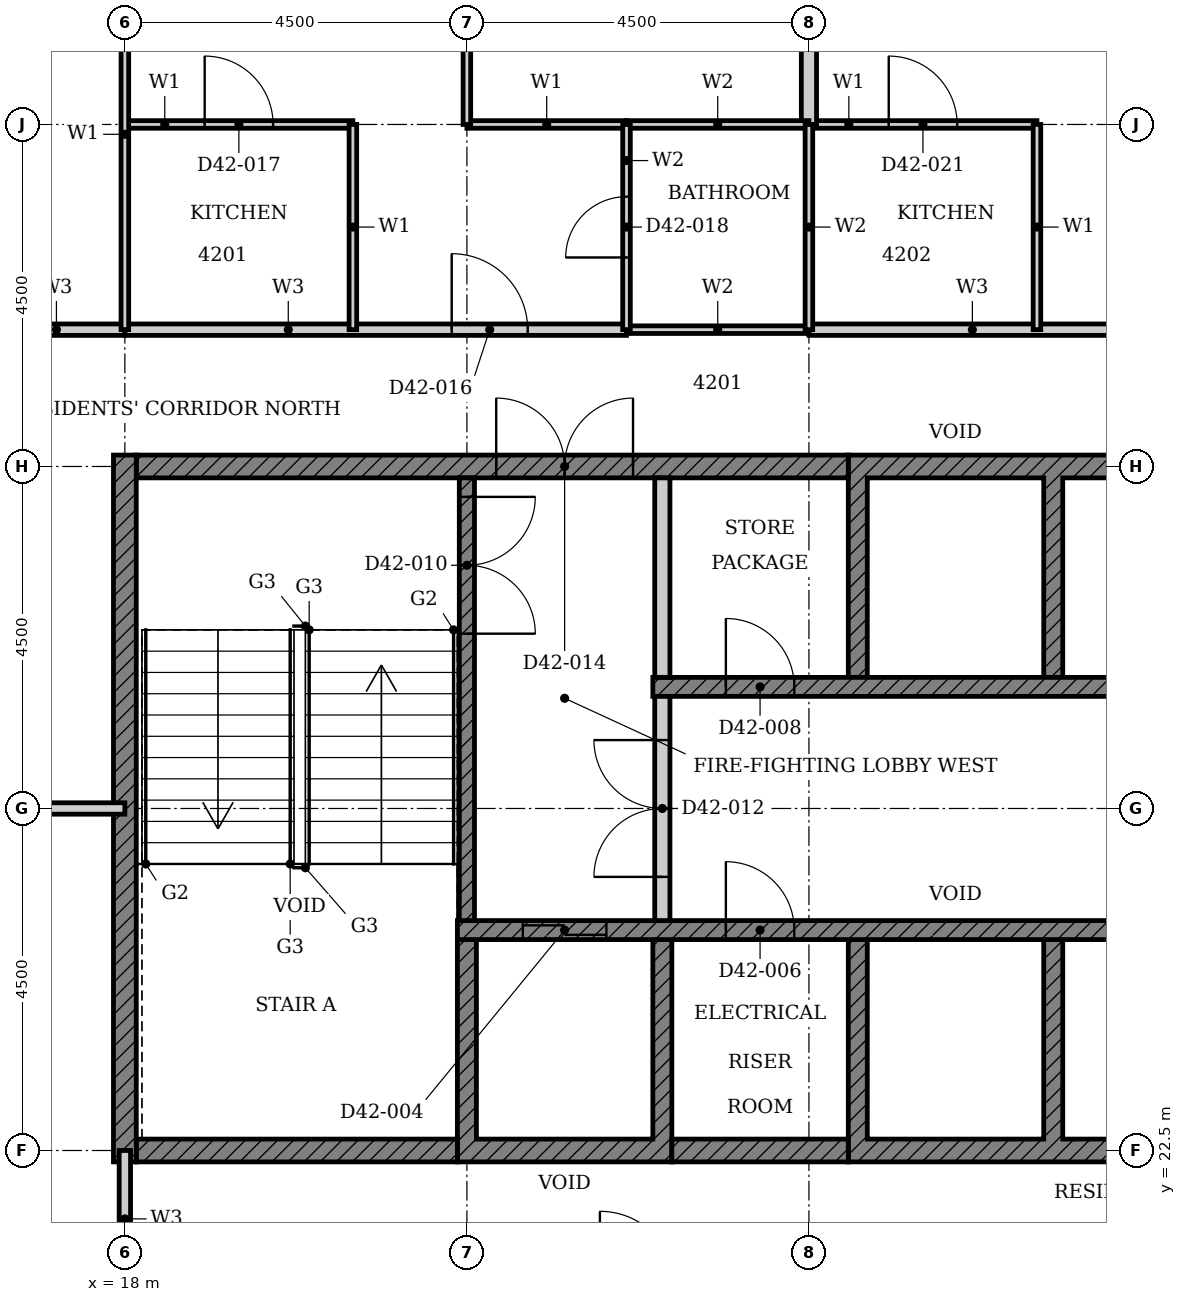
"""IFC4 building model, lengths in metres.
Left out: names, types, materials, properties, quantities, classifications, styles, units other than length and angle.
Written with IfcOpenShell. Run it as: python <this file> out.ifc"""

import sys

from ifc_helpers import new_model, si_unit, direction, frame, frame_2d, origin, place, context, subcontext, project, spatial, polyline, rectangle, outline, extrude, element, fill, save


model = new_model("IFC4")
c1 = context("Model", 3, precision=1e-05, world=origin(), true_north=direction((0.0, 1.0)))
c2 = subcontext(c1, "Body", "Model", "MODEL_VIEW")
j1 = project(units=[si_unit("LENGTHUNIT", "METRE"), si_unit("PLANEANGLEUNIT", "RADIAN")], contexts=[c1])
p1 = place(None, origin())
s1 = spatial("IfcSite", under=j1, at=p1, CompositionType="ELEMENT")
p2 = place(p1, origin())
s2 = spatial("IfcBuilding", under=s1, at=p2, CompositionType="ELEMENT")
p3 = place(p2, frame((0.0, 0.0, 169.1)))
s3 = spatial("IfcBuildingStorey", under=s2, at=p3, CompositionType="ELEMENT", Elevation=169.1)
p4 = place(p3, origin())
e1 = element("IfcWall", 1, at=p4, inside=s3, PredefinedType="SHEAR", context=c2, shape_type="SweptSolid", body=[
    extrude(outline(polyline([(22.375, 22.35), (25.197, 22.35), (25.197, 25.275), (24.947, 25.275), (24.947, 22.65), (22.625, 22.65), (22.625, 25.275), (22.375, 25.275), (22.375, 22.35)])), origin(), (0.0, 0.0, 1.0), 3.4),
])
p5 = place(p3, origin())
e2 = element("IfcWall", 2, at=p5, inside=s3, PredefinedType="SHEAR", context=c2, shape_type="SweptSolid", body=[
    extrude(outline(polyline([(27.518, 22.35), (32.911, 22.35), (32.911, 25.275), (32.661, 25.275), (32.661, 22.65), (30.339, 22.65), (30.339, 25.275), (30.089, 25.275), (30.089, 22.65), (27.768, 22.65), (27.768, 25.275), (27.518, 25.275), (27.518, 22.35)])), origin(), (0.0, 0.0, 1.0), 3.4),
])
p6 = place(p3, origin())
e3 = element("IfcWall", 3, at=p6, inside=s3, PredefinedType="SHEAR", context=c2, shape_type="SweptSolid", body=[
    extrude(outline(polyline([(27.518, 28.725), (27.768, 28.725), (27.768, 31.35), (30.089, 31.35), (30.089, 28.725), (30.339, 28.725), (30.339, 31.35), (32.661, 31.35), (32.661, 28.725), (32.911, 28.725), (32.911, 31.65), (27.518, 31.65), (27.518, 28.725)])), origin(), (0.0, 0.0, 1.0), 3.4),
])
p7 = place(p3, frame((18.15, 22.5, 0.0), z_axis=(0.0, 0.0, 1.0), x_axis=(1.0, 0.0, 0.0)))
e4 = element("IfcWall", 4, at=p7, inside=s3, PredefinedType="SHEAR", context=c2, shape_type="SweptSolid", body=[
    extrude(rectangle(XDim=4.225, YDim=0.3, at=frame_2d((2.113, 0.0))), origin(), (0.0, 0.0, 1.0), 3.4),
])
p8 = place(p3, frame((25.197, 22.5, 0.0), z_axis=(0.0, 0.0, 1.0), x_axis=(1.0, 0.0, 0.0)))
e5 = element("IfcWall", 5, at=p8, inside=s3, PredefinedType="SHEAR", context=c2, shape_type="SweptSolid", body=[
    extrude(rectangle(XDim=2.321, YDim=0.3, at=frame_2d((1.161, 0.0))), origin(), (0.0, 0.0, 1.0), 3.4),
])
p9 = place(p3, frame((18.15, 31.5, 0.0), z_axis=(0.0, 0.0, 1.0), x_axis=(1.0, 0.0, 0.0)))
e6 = element("IfcWall", 6, at=p9, inside=s3, PredefinedType="SHEAR", context=c2, shape_type="SweptSolid", body=[
    extrude(rectangle(XDim=9.368, YDim=0.3, at=frame_2d((4.684, 0.0))), origin(), (0.0, 0.0, 1.0), 3.4),
])
p10 = place(p9, frame((4.736, 0.0, 0.0)))
e7 = element("IfcOpeningElement", 7, at=p10, cuts=e6, PredefinedType="OPENING", context=c2, shape_type="SweptSolid", body=[
    extrude(rectangle(XDim=1.8, YDim=2.1, at=frame_2d((0.9, 1.05))), frame((0.0, 0.16, 0.0), z_axis=(0.0, -1.0, 0.0), x_axis=(1.0, 0.0, 0.0)), (0.0, 0.0, 1.0), 0.32),
])
p11 = place(p3, frame((18.0, 22.35, 0.0), z_axis=(0.0, 0.0, 1.0), x_axis=(0.0, 1.0, 0.0)))
e8 = element("IfcWall", 8, at=p11, inside=s3, PredefinedType="SHEAR", context=c2, shape_type="SweptSolid", body=[
    extrude(rectangle(XDim=9.3, YDim=0.3, at=frame_2d((4.65, 0.0))), origin(), (0.0, 0.0, 1.0), 3.4),
])
p12 = place(p3, frame((22.375, 25.4, 0.0), z_axis=(0.0, 0.0, 1.0), x_axis=(1.0, 0.0, 0.0)))
e9 = element("IfcWall", 9, at=p12, inside=s3, PredefinedType="SHEAR", context=c2, shape_type="SweptSolid", body=[
    extrude(rectangle(XDim=15.678, YDim=0.25, at=frame_2d((7.839, 0.0))), origin(), (0.0, 0.0, 1.0), 3.4),
])
p13 = place(p12, frame((8.575, 0.0, 0.0)))
e10 = element("IfcOpeningElement", 10, at=p13, cuts=e9, PredefinedType="OPENING", context=c2, shape_type="SweptSolid", body=[
    extrude(rectangle(XDim=1.1, YDim=2.1, at=frame_2d((0.55, 1.05))), frame((0.0, 0.135, 0.0), z_axis=(0.0, -1.0, 0.0), x_axis=(1.0, 0.0, 0.0)), (0.0, 0.0, 1.0), 0.27),
])
p14 = place(p12, frame((0.861, 0.0, 0.0)))
e11 = element("IfcOpeningElement", 11, at=p14, cuts=e9, PredefinedType="OPENING", context=c2, shape_type="SweptSolid", body=[
    extrude(rectangle(XDim=1.1, YDim=2.1, at=frame_2d((0.55, 1.05))), frame((0.0, 0.135, 0.0), z_axis=(0.0, -1.0, 0.0), x_axis=(1.0, 0.0, 0.0)), (0.0, 0.0, 1.0), 0.27),
])
p15 = place(p12, frame((3.532, 0.0, 0.0)))
e12 = element("IfcOpeningElement", 12, at=p15, cuts=e9, PredefinedType="OPENING", context=c2, shape_type="SweptSolid", body=[
    extrude(rectangle(XDim=0.9, YDim=2.1, at=frame_2d((0.45, 1.05))), frame((0.0, 0.135, 0.0), z_axis=(0.0, -1.0, 0.0), x_axis=(1.0, 0.0, 0.0)), (0.0, 0.0, 1.0), 0.27),
])
p16 = place(p12, frame((12.532, 0.0, 0.0)))
e13 = element("IfcOpeningElement", 13, at=p16, cuts=e9, PredefinedType="OPENING", context=c2, shape_type="SweptSolid", body=[
    extrude(rectangle(XDim=0.9, YDim=2.1, at=frame_2d((0.45, 1.05))), frame((0.0, 0.135, 0.0), z_axis=(0.0, -1.0, 0.0), x_axis=(1.0, 0.0, 0.0)), (0.0, 0.0, 1.0), 0.27),
])
p17 = place(p3, frame((24.947, 28.6, 0.0), z_axis=(0.0, 0.0, 1.0), x_axis=(1.0, 0.0, 0.0)))
e14 = element("IfcWall", 14, at=p17, inside=s3, PredefinedType="SHEAR", context=c2, shape_type="SweptSolid", body=[
    extrude(rectangle(XDim=15.678, YDim=0.25, at=frame_2d((7.839, 0.0))), origin(), (0.0, 0.0, 1.0), 3.4),
])
p18 = place(p17, frame((6.004, 0.0, 0.0)))
e15 = element("IfcOpeningElement", 15, at=p18, cuts=e14, PredefinedType="OPENING", context=c2, shape_type="SweptSolid", body=[
    extrude(rectangle(XDim=1.1, YDim=2.1, at=frame_2d((0.55, 1.05))), frame((0.0, 0.135, 0.0), z_axis=(0.0, -1.0, 0.0), x_axis=(1.0, 0.0, 0.0)), (0.0, 0.0, 1.0), 0.27),
])
p19 = place(p17, frame((11.146, 0.0, 0.0)))
e16 = element("IfcOpeningElement", 16, at=p19, cuts=e14, PredefinedType="OPENING", context=c2, shape_type="SweptSolid", body=[
    extrude(rectangle(XDim=1.1, YDim=2.1, at=frame_2d((0.55, 1.05))), frame((0.0, 0.135, 0.0), z_axis=(0.0, -1.0, 0.0), x_axis=(1.0, 0.0, 0.0)), (0.0, 0.0, 1.0), 0.27),
])
p20 = place(p17, frame((13.718, 0.0, 0.0)))
e17 = element("IfcOpeningElement", 17, at=p20, cuts=e14, PredefinedType="OPENING", context=c2, shape_type="SweptSolid", body=[
    extrude(rectangle(XDim=1.1, YDim=2.1, at=frame_2d((0.55, 1.05))), frame((0.0, 0.135, 0.0), z_axis=(0.0, -1.0, 0.0), x_axis=(1.0, 0.0, 0.0)), (0.0, 0.0, 1.0), 0.27),
])
p21 = place(p17, frame((0.961, 0.0, 0.0)))
e18 = element("IfcOpeningElement", 18, at=p21, cuts=e14, PredefinedType="OPENING", context=c2, shape_type="SweptSolid", body=[
    extrude(rectangle(XDim=0.9, YDim=2.1, at=frame_2d((0.45, 1.05))), frame((0.0, 0.135, 0.0), z_axis=(0.0, -1.0, 0.0), x_axis=(1.0, 0.0, 0.0)), (0.0, 0.0, 1.0), 0.27),
])
p22 = place(p17, frame((8.675, 0.0, 0.0)))
e19 = element("IfcOpeningElement", 19, at=p22, cuts=e14, PredefinedType="OPENING", context=c2, shape_type="SweptSolid", body=[
    extrude(rectangle(XDim=0.9, YDim=2.1, at=frame_2d((0.45, 1.05))), frame((0.0, 0.135, 0.0), z_axis=(0.0, -1.0, 0.0), x_axis=(1.0, 0.0, 0.0)), (0.0, 0.0, 1.0), 0.27),
])
p23 = place(p3, frame((25.072, 28.725, 0.0), z_axis=(0.0, 0.0, 1.0), x_axis=(0.0, 1.0, 0.0)))
e20 = element("IfcWall", 20, at=p23, inside=s3, PredefinedType="PARTITIONING", context=c2, shape_type="SweptSolid", body=[
    extrude(rectangle(XDim=2.625, YDim=0.2, at=frame_2d((1.312, 0.0))), origin(), (0.0, 0.0, 1.0), 3.4),
])
p24 = place(p3, frame((22.5, 31.35, 0.0), z_axis=(0.0, 0.0, 1.0), x_axis=(0.0, -1.0, 0.0)))
e21 = element("IfcWall", 21, at=p24, inside=s3, PredefinedType="SHEAR", context=c2, shape_type="SweptSolid", body=[
    extrude(rectangle(XDim=5.825, YDim=0.2, at=frame_2d((2.913, 0.0))), origin(), (0.0, 0.0, 1.0), 3.4),
])
p25 = place(p24, frame((0.25, 0.0, 0.0)))
e22 = element("IfcOpeningElement", 22, at=p25, cuts=e21, PredefinedType="OPENING", context=c2, shape_type="SweptSolid", body=[
    extrude(rectangle(XDim=1.8, YDim=2.1, at=frame_2d((0.9, 1.05))), frame((0.0, 0.11, 0.0), z_axis=(0.0, -1.0, 0.0), x_axis=(1.0, 0.0, 0.0)), (0.0, 0.0, 1.0), 0.22),
])
p26 = place(p3, frame((25.072, 25.525, 0.0), z_axis=(0.0, 0.0, 1.0), x_axis=(0.0, 1.0, 0.0)))
e23 = element("IfcWall", 23, at=p26, inside=s3, PredefinedType="PARTITIONING", context=c2, shape_type="SweptSolid", body=[
    extrude(rectangle(XDim=2.95, YDim=0.2, at=frame_2d((1.475, 0.0))), origin(), (0.0, 0.0, 1.0), 3.4),
])
p27 = place(p26, frame((0.575, 0.0, 0.0)))
e24 = element("IfcOpeningElement", 24, at=p27, cuts=e23, PredefinedType="OPENING", context=c2, shape_type="SweptSolid", body=[
    extrude(rectangle(XDim=1.8, YDim=2.1, at=frame_2d((0.9, 1.05))), frame((0.0, 0.11, 0.0), z_axis=(0.0, -1.0, 0.0), x_axis=(1.0, 0.0, 0.0)), (0.0, 0.0, 1.0), 0.22),
])
p28 = place(p3, frame((4.5, 27.0, 0.0), z_axis=(0.0, 0.0, 1.0), x_axis=(1.0, 0.0, 0.0)))
e25 = element("IfcWall", 25, at=p28, inside=s3, PredefinedType="PARTITIONING", context=c2, shape_type="SweptSolid", body=[
    extrude(rectangle(XDim=13.5, YDim=0.15, at=frame_2d((6.75, 0.0))), origin(), (0.0, 0.0, 1.0), 2.68),
])
p29 = place(p28, frame((5.35, 0.0, 0.0)))
e26 = element("IfcOpeningElement", 26, at=p29, cuts=e25, PredefinedType="OPENING", context=c2, shape_type="SweptSolid", body=[
    extrude(rectangle(XDim=1.0, YDim=2.1, at=frame_2d((0.5, 1.05))), frame((0.0, 0.085, 0.0), z_axis=(0.0, -1.0, 0.0), x_axis=(1.0, 0.0, 0.0)), (0.0, 0.0, 1.0), 0.17),
])
p30 = place(p3, frame((18.0, 33.3, 0.0), z_axis=(0.0, 0.0, 1.0), x_axis=(1.0, 0.0, 0.0)))
e27 = element("IfcWall", 27, at=p30, inside=s3, PredefinedType="PARTITIONING", context=c2, shape_type="SweptSolid", body=[
    extrude(rectangle(XDim=6.6, YDim=0.15, at=frame_2d((3.3, 0.0))), origin(), (0.0, 0.0, 1.0), 3.4),
])
p31 = place(p30, frame((4.3, 0.0, 0.0)))
e28 = element("IfcOpeningElement", 28, at=p31, cuts=e27, PredefinedType="OPENING", context=c2, shape_type="SweptSolid", body=[
    extrude(rectangle(XDim=1.0, YDim=2.2, at=frame_2d((0.5, 1.1))), frame((0.0, 0.085, 0.0), z_axis=(0.0, -1.0, 0.0), x_axis=(1.0, 0.0, 0.0)), (0.0, 0.0, 1.0), 0.17),
])
p32 = place(p3, frame((27.0, 33.3, 0.0), z_axis=(0.0, 0.0, 1.0), x_axis=(1.0, 0.0, 0.0)))
e29 = element("IfcWall", 29, at=p32, inside=s3, PredefinedType="PARTITIONING", context=c2, shape_type="SweptSolid", body=[
    extrude(rectangle(XDim=6.6, YDim=0.15, at=frame_2d((3.3, 0.0))), origin(), (0.0, 0.0, 1.0), 3.4),
])
p33 = place(p32, frame((4.3, 0.0, 0.0)))
e30 = element("IfcOpeningElement", 30, at=p33, cuts=e29, PredefinedType="OPENING", context=c2, shape_type="SweptSolid", body=[
    extrude(rectangle(XDim=1.0, YDim=2.2, at=frame_2d((0.5, 1.1))), frame((0.0, 0.085, 0.0), z_axis=(0.0, -1.0, 0.0), x_axis=(1.0, 0.0, 0.0)), (0.0, 0.0, 1.0), 0.17),
])
p34 = place(p3, frame((16.2, 33.3, 0.0), z_axis=(0.0, 0.0, 1.0), x_axis=(1.0, 0.0, 0.0)))
e31 = element("IfcWall", 31, at=p34, inside=s3, PredefinedType="PARTITIONING", context=c2, shape_type="SweptSolid", body=[
    extrude(rectangle(XDim=1.799, YDim=0.15, at=frame_2d((0.899, 0.0))), origin(), (0.0, 0.0, 1.0), 3.4),
])
p35 = place(p3, frame((18.0, 20.7, 0.0), z_axis=(0.0, 0.0, 1.0), x_axis=(0.0, 1.0, 0.0)))
e32 = element("IfcWall", 32, at=p35, inside=s3, PredefinedType="PARTITIONING", context=c2, shape_type="SweptSolid", body=[
    extrude(rectangle(XDim=1.8, YDim=0.15, at=frame_2d((0.9, 0.0))), origin(), (0.0, 0.0, 1.0), 3.4),
])
p36 = place(p3, frame((22.5, 36.0, 0.0), z_axis=(0.0, 0.0, 1.0), x_axis=(1.0, 0.0, 0.0)))
e33 = element("IfcWall", 33, at=p36, inside=s3, PredefinedType="PARTITIONING", context=c2, shape_type="SweptSolid", body=[
    extrude(rectangle(XDim=2.1, YDim=0.1, at=frame_2d((1.05, 0.0))), origin(), (0.0, 0.0, 1.0), 3.4),
])
p37 = place(p3, frame((18.0, 36.0, 0.0), z_axis=(0.0, 0.0, 1.0), x_axis=(1.0, 0.0, 0.0)))
e34 = element("IfcWall", 34, at=p37, inside=s3, PredefinedType="PARTITIONING", context=c2, shape_type="SweptSolid", body=[
    extrude(rectangle(XDim=3.0, YDim=0.1, at=frame_2d((1.5, 0.0))), origin(), (0.0, 0.0, 1.0), 3.4),
])
p38 = place(p37, frame((1.05, 0.0, 0.0)))
e35 = element("IfcOpeningElement", 35, at=p38, cuts=e34, PredefinedType="OPENING", context=c2, shape_type="SweptSolid", body=[
    extrude(rectangle(XDim=0.9, YDim=2.1, at=frame_2d((0.45, 1.05))), frame((0.0, 0.06, 0.0), z_axis=(0.0, -1.0, 0.0), x_axis=(1.0, 0.0, 0.0)), (0.0, 0.0, 1.0), 0.12),
])
p39 = place(p3, frame((27.0, 36.0, 0.0), z_axis=(0.0, 0.0, 1.0), x_axis=(1.0, 0.0, 0.0)))
e36 = element("IfcWall", 36, at=p39, inside=s3, PredefinedType="PARTITIONING", context=c2, shape_type="SweptSolid", body=[
    extrude(rectangle(XDim=3.0, YDim=0.1, at=frame_2d((1.5, 0.0))), origin(), (0.0, 0.0, 1.0), 3.4),
])
p40 = place(p39, frame((1.05, 0.0, 0.0)))
e37 = element("IfcOpeningElement", 37, at=p40, cuts=e36, PredefinedType="OPENING", context=c2, shape_type="SweptSolid", body=[
    extrude(rectangle(XDim=0.9, YDim=2.1, at=frame_2d((0.45, 1.05))), frame((0.0, 0.06, 0.0), z_axis=(0.0, -1.0, 0.0), x_axis=(1.0, 0.0, 0.0)), (0.0, 0.0, 1.0), 0.12),
])
p41 = place(p3, frame((18.0, 33.301, 0.0), z_axis=(0.0, 0.0, 1.0), x_axis=(0.0, 1.0, 0.0)))
e38 = element("IfcWall", 38, at=p41, inside=s3, PredefinedType="PARTITIONING", context=c2, shape_type="SweptSolid", body=[
    extrude(rectangle(XDim=5.139, YDim=0.1, at=frame_2d((2.569, 0.0))), origin(), (0.0, 0.0, 1.0), 3.4),
])
p42 = place(p3, frame((21.0, 33.3, 0.0), z_axis=(0.0, 0.0, 1.0), x_axis=(0.0, 1.0, 0.0)))
e39 = element("IfcWall", 39, at=p42, inside=s3, PredefinedType="PARTITIONING", context=c2, shape_type="SweptSolid", body=[
    extrude(rectangle(XDim=2.7, YDim=0.1, at=frame_2d((1.35, 0.0))), origin(), (0.0, 0.0, 1.0), 3.4),
])
p43 = place(p3, frame((22.5, 36.0, 0.0), z_axis=(0.0, 0.0, 1.0), x_axis=(0.0, 1.0, 0.0)))
e40 = element("IfcWall", 40, at=p43, inside=s3, PredefinedType="PARTITIONING", context=c2, shape_type="SweptSolid", body=[
    extrude(rectangle(XDim=4.815, YDim=0.1, at=frame_2d((2.407, 0.0))), origin(), (0.0, 0.0, 1.0), 3.4),
])
p44 = place(p43, frame((1.8, 0.0, 0.0)))
e41 = element("IfcOpeningElement", 41, at=p44, cuts=e40, PredefinedType="OPENING", context=c2, shape_type="SweptSolid", body=[
    extrude(rectangle(XDim=0.9, YDim=2.1, at=frame_2d((0.45, 1.05))), frame((0.0, 0.06, 0.0), z_axis=(0.0, -1.0, 0.0), x_axis=(1.0, 0.0, 0.0)), (0.0, 0.0, 1.0), 0.12),
])
p45 = place(p3, frame((30.0, 33.3, 0.0), z_axis=(0.0, 0.0, 1.0), x_axis=(0.0, 1.0, 0.0)))
e42 = element("IfcWall", 42, at=p45, inside=s3, PredefinedType="PARTITIONING", context=c2, shape_type="SweptSolid", body=[
    extrude(rectangle(XDim=2.7, YDim=0.1, at=frame_2d((1.35, 0.0))), origin(), (0.0, 0.0, 1.0), 3.4),
])
p46 = place(p3, frame((27.0, 36.0, 0.0), z_axis=(0.0, 0.0, 1.0), x_axis=(0.0, 1.0, 0.0)))
e43 = element("IfcWall", 43, at=p46, inside=s3, PredefinedType="PARTITIONING", context=c2, shape_type="SweptSolid", body=[
    extrude(rectangle(XDim=4.69, YDim=0.2, at=frame_2d((2.345, 0.0))), origin(), (0.0, 0.0, 1.0), 3.4),
])
for number, where, z_axis, x_axis in (
    (44, (24.6, 33.3, 0.0), (0.0, 0.0, 1.0), (1.0, 0.0, 0.0)),
    (45, (24.6, 36.0, 0.0), (0.0, 0.0, 1.0), (1.0, 0.0, 0.0)),
):
    element("IfcWall", number, at=place(p3, frame(where, z_axis=z_axis, x_axis=x_axis)), inside=s3, PredefinedType="PARTITIONING", context=c2, shape_type="SweptSolid", body=[
        extrude(rectangle(XDim=2.4, YDim=0.1, at=frame_2d((1.2, 0.0))), origin(), (0.0, 0.0, 1.0), 3.4),
    ])
p47 = place(p3, frame((24.6, 33.3, 0.0), z_axis=(0.0, 0.0, 1.0), x_axis=(0.0, 1.0, 0.0)))
e46 = element("IfcWall", 46, at=p47, inside=s3, PredefinedType="PARTITIONING", context=c2, shape_type="SweptSolid", body=[
    extrude(rectangle(XDim=2.7, YDim=0.1, at=frame_2d((1.35, 0.0))), origin(), (0.0, 0.0, 1.0), 3.4),
])
p48 = place(p47, frame((0.95, 0.0, 0.0)))
e47 = element("IfcOpeningElement", 47, at=p48, cuts=e46, PredefinedType="OPENING", context=c2, shape_type="SweptSolid", body=[
    extrude(rectangle(XDim=0.8, YDim=2.1, at=frame_2d((0.4, 1.05))), frame((0.0, 0.06, 0.0), z_axis=(0.0, -1.0, 0.0), x_axis=(1.0, 0.0, 0.0)), (0.0, 0.0, 1.0), 0.12),
])
p49 = place(p3, frame((27.0, 33.3, 0.0), z_axis=(0.0, 0.0, 1.0), x_axis=(0.0, 1.0, 0.0)))
e48 = element("IfcWall", 48, at=p49, inside=s3, PredefinedType="PARTITIONING", context=c2, shape_type="SweptSolid", body=[
    extrude(rectangle(XDim=2.7, YDim=0.1, at=frame_2d((1.35, 0.0))), origin(), (0.0, 0.0, 1.0), 3.4),
])
p50 = place(p14, origin())
e49 = element("IfcDoor", 49, at=p50, inside=s3, OperationType="DOUBLE_DOOR_SLIDING", PredefinedType="DOOR", context=c2, shape_type="SweptSolid", body=[
    extrude(rectangle(XDim=1.1, YDim=2.1, at=frame_2d((0.55, 1.05))), frame((0.0, 0.025, 0.0), z_axis=(0.0, -1.0, 0.0), x_axis=(1.0, 0.0, 0.0)), (0.0, 0.0, 1.0), 0.05),
])
fill(e11, e49)
p51 = place(p15, origin())
e50 = element("IfcDoor", 50, at=p51, inside=s3, OperationType="SINGLE_SWING_LEFT", PredefinedType="DOOR", context=c2, shape_type="SweptSolid", body=[
    extrude(rectangle(XDim=0.9, YDim=2.1, at=frame_2d((0.45, 1.05))), frame((0.0, 0.025, 0.0), z_axis=(0.0, -1.0, 0.0), x_axis=(1.0, 0.0, 0.0)), (0.0, 0.0, 1.0), 0.05),
])
fill(e12, e50)
p52 = place(p21, origin())
e51 = element("IfcDoor", 51, at=p52, inside=s3, OperationType="SINGLE_SWING_LEFT", PredefinedType="DOOR", context=c2, shape_type="SweptSolid", body=[
    extrude(rectangle(XDim=0.9, YDim=2.1, at=frame_2d((0.45, 1.05))), frame((0.0, 0.025, 0.0), z_axis=(0.0, -1.0, 0.0), x_axis=(1.0, 0.0, 0.0)), (0.0, 0.0, 1.0), 0.05),
])
fill(e18, e51)
p53 = place(p25, origin())
e52 = element("IfcDoor", 52, at=p53, inside=s3, OperationType="DOUBLE_DOOR_SINGLE_SWING", PredefinedType="DOOR", context=c2, shape_type="SweptSolid", body=[
    extrude(rectangle(XDim=1.8, YDim=2.1, at=frame_2d((0.9, 1.05))), frame((0.0, 0.025, 0.0), z_axis=(0.0, -1.0, 0.0), x_axis=(1.0, 0.0, 0.0)), (0.0, 0.0, 1.0), 0.05),
])
fill(e22, e52)
p54 = place(p27, origin())
e53 = element("IfcDoor", 53, at=p54, inside=s3, OperationType="DOUBLE_DOOR_SINGLE_SWING", PredefinedType="DOOR", context=c2, shape_type="SweptSolid", body=[
    extrude(rectangle(XDim=1.8, YDim=2.1, at=frame_2d((0.9, 1.05))), frame((0.0, 0.025, 0.0), z_axis=(0.0, -1.0, 0.0), x_axis=(1.0, 0.0, 0.0)), (0.0, 0.0, 1.0), 0.05),
])
fill(e24, e53)
p55 = place(p10, origin())
e54 = element("IfcDoor", 54, at=p55, inside=s3, OperationType="DOUBLE_DOOR_SINGLE_SWING", PredefinedType="DOOR", context=c2, shape_type="SweptSolid", body=[
    extrude(rectangle(XDim=1.8, YDim=2.1, at=frame_2d((0.9, 1.05))), frame((0.0, 0.025, 0.0), z_axis=(0.0, -1.0, 0.0), x_axis=(1.0, 0.0, 0.0)), (0.0, 0.0, 1.0), 0.05),
])
fill(e7, e54)
p56 = place(p31, origin())
e55 = element("IfcDoor", 55, at=p56, inside=s3, OperationType="SINGLE_SWING_LEFT", PredefinedType="DOOR", context=c2, shape_type="SweptSolid", body=[
    extrude(rectangle(XDim=1.0, YDim=2.2, at=frame_2d((0.5, 1.1))), frame((0.0, 0.025, 0.0), z_axis=(0.0, -1.0, 0.0), x_axis=(1.0, 0.0, 0.0)), (0.0, 0.0, 1.0), 0.05),
])
fill(e28, e55)
p57 = place(p38, origin())
e56 = element("IfcDoor", 56, at=p57, inside=s3, OperationType="SINGLE_SWING_RIGHT", PredefinedType="DOOR", context=c2, shape_type="SweptSolid", body=[
    extrude(rectangle(XDim=0.9, YDim=2.1, at=frame_2d((0.45, 1.05))), frame((0.0, 0.025, 0.0), z_axis=(0.0, -1.0, 0.0), x_axis=(1.0, 0.0, 0.0)), (0.0, 0.0, 1.0), 0.05),
])
fill(e35, e56)
p58 = place(p48, origin())
e57 = element("IfcDoor", 57, at=p58, inside=s3, OperationType="SINGLE_SWING_RIGHT", PredefinedType="DOOR", context=c2, shape_type="SweptSolid", body=[
    extrude(rectangle(XDim=0.8, YDim=2.1, at=frame_2d((0.4, 1.05))), frame((0.0, 0.025, 0.0), z_axis=(0.0, -1.0, 0.0), x_axis=(1.0, 0.0, 0.0)), (0.0, 0.0, 1.0), 0.05),
])
fill(e47, e57)
p59 = place(p40, origin())
e58 = element("IfcDoor", 58, at=p59, inside=s3, OperationType="SINGLE_SWING_RIGHT", PredefinedType="DOOR", context=c2, shape_type="SweptSolid", body=[
    extrude(rectangle(XDim=0.9, YDim=2.1, at=frame_2d((0.45, 1.05))), frame((0.0, 0.025, 0.0), z_axis=(0.0, -1.0, 0.0), x_axis=(1.0, 0.0, 0.0)), (0.0, 0.0, 1.0), 0.05),
])
fill(e37, e58)
save(model, sys.argv[1])
